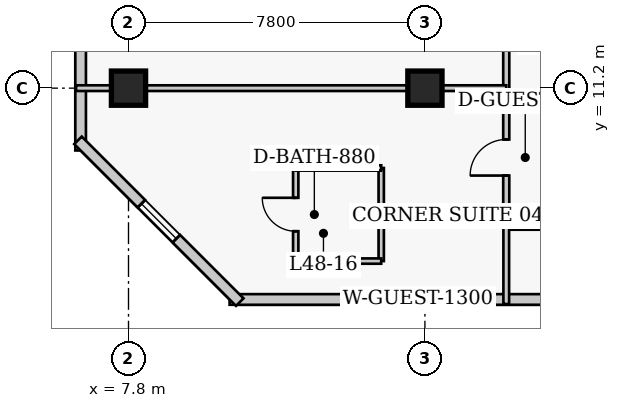
"""IFC4 building model, lengths in metres.
Left out: names, types, materials, properties, quantities, classifications, styles, units other than length and angle.
Written with IfcOpenShell. Run it as: python <this file> out.ifc"""

import sys

from ifc_helpers import new_model, si_unit, direction, frame, frame_2d, origin, origin_2d, place, context, subcontext, project, spatial, rectangle, extrude, element, fill, save


model = new_model("IFC4")
c1 = context("Model", 3, precision=1e-05, world=origin(), true_north=direction((0.0, 1.0)))
c2 = subcontext(c1, "Body", "Model", "MODEL_VIEW")
j1 = project(units=[si_unit("LENGTHUNIT", "METRE"), si_unit("PLANEANGLEUNIT", "RADIAN")], contexts=[c1])
p1 = place(None, origin())
s1 = spatial("IfcSite", under=j1, at=p1, CompositionType="ELEMENT")
p2 = place(p1, origin())
s2 = spatial("IfcBuilding", under=s1, at=p2, CompositionType="ELEMENT")
p3 = place(p2, frame((0.0, 0.0, 192.9)))
s3 = spatial("IfcBuildingStorey", under=s2, at=p3, CompositionType="ELEMENT", Elevation=192.9)
for number, where, z_axis, x_axis in (
    (1, (7.8, 11.2, 0.0), (0.0, 0.0, 1.0), (1.0, 0.0, 0.0)),
    (2, (15.6, 11.2, 0.0), (0.0, 0.0, 1.0), (1.0, 0.0, 0.0)),
):
    element("IfcColumn", number, at=place(p3, frame(where, z_axis=z_axis, x_axis=x_axis)), inside=s3, PredefinedType="COLUMN", context=c2, shape_type="SweptSolid", body=[
        extrude(rectangle(XDim=0.9, YDim=0.9, at=origin_2d()), origin(), (0.0, 0.0, 1.0), 3.9),
    ])
p4 = place(p3, frame((10.46, 5.64, 0.0), z_axis=(0.0, 0.0, 1.0), x_axis=(1.0, 0.0, 0.0)))
e3 = element("IfcWall", 3, at=p4, inside=s3, PredefinedType="SOLIDWALL", context=c2, shape_type="SweptSolid", body=[
    extrude(rectangle(XDim=25.83, YDim=0.28, at=frame_2d((12.915, 0.0))), origin(), (0.0, 0.0, 1.0), 3.65),
])
p5 = place(p4, frame((4.305, 0.0, 0.85)))
e4 = element("IfcOpeningElement", 4, at=p5, cuts=e3, PredefinedType="OPENING", context=c2, shape_type="SweptSolid", body=[
    extrude(rectangle(XDim=1.3, YDim=1.7, at=frame_2d((0.65, 0.85))), frame((0.0, 0.15, 0.0), z_axis=(0.0, -1.0, 0.0), x_axis=(1.0, 0.0, 0.0)), (0.0, 0.0, 1.0), 0.3),
])
p6 = place(p4, frame((11.615, 0.0, 0.85)))
e5 = element("IfcOpeningElement", 5, at=p6, cuts=e3, PredefinedType="OPENING", context=c2, shape_type="SweptSolid", body=[
    extrude(rectangle(XDim=1.3, YDim=1.7, at=frame_2d((0.65, 0.85))), frame((0.0, 0.15, 0.0), z_axis=(0.0, -1.0, 0.0), x_axis=(1.0, 0.0, 0.0)), (0.0, 0.0, 1.0), 0.3),
])
p7 = place(p4, frame((20.875, 0.0, 0.85)))
e6 = element("IfcOpeningElement", 6, at=p7, cuts=e3, PredefinedType="OPENING", context=c2, shape_type="SweptSolid", body=[
    extrude(rectangle(XDim=1.3, YDim=1.7, at=frame_2d((0.65, 0.85))), frame((0.0, 0.15, 0.0), z_axis=(0.0, -1.0, 0.0), x_axis=(1.0, 0.0, 0.0)), (0.0, 0.0, 1.0), 0.3),
])
p8 = place(p3, frame((6.54, 39.44, 0.0), z_axis=(0.0, 0.0, 1.0), x_axis=(0.0, -1.0, 0.0)))
e7 = element("IfcWall", 7, at=p8, inside=s3, PredefinedType="SOLIDWALL", context=c2, shape_type="SweptSolid", body=[
    extrude(rectangle(XDim=29.88, YDim=0.28, at=frame_2d((14.94, 0.0))), origin(), (0.0, 0.0, 1.0), 3.65),
])
p9 = place(p8, frame((2.435, 0.0, 0.85)))
e8 = element("IfcOpeningElement", 8, at=p9, cuts=e7, PredefinedType="OPENING", context=c2, shape_type="SweptSolid", body=[
    extrude(rectangle(XDim=1.3, YDim=1.7, at=frame_2d((0.65, 0.85))), frame((0.0, 0.15, 0.0), z_axis=(0.0, -1.0, 0.0), x_axis=(1.0, 0.0, 0.0)), (0.0, 0.0, 1.0), 0.3),
])
p10 = place(p8, frame((11.205, 0.0, 0.85)))
e9 = element("IfcOpeningElement", 9, at=p10, cuts=e7, PredefinedType="OPENING", context=c2, shape_type="SweptSolid", body=[
    extrude(rectangle(XDim=1.3, YDim=1.7, at=frame_2d((0.65, 0.85))), frame((0.0, 0.15, 0.0), z_axis=(0.0, -1.0, 0.0), x_axis=(1.0, 0.0, 0.0)), (0.0, 0.0, 1.0), 0.3),
])
p11 = place(p8, frame((17.375, 0.0, 0.85)))
e10 = element("IfcOpeningElement", 10, at=p11, cuts=e7, PredefinedType="OPENING", context=c2, shape_type="SweptSolid", body=[
    extrude(rectangle(XDim=1.3, YDim=1.7, at=frame_2d((0.65, 0.85))), frame((0.0, 0.15, 0.0), z_axis=(0.0, -1.0, 0.0), x_axis=(1.0, 0.0, 0.0)), (0.0, 0.0, 1.0), 0.3),
])
p12 = place(p8, frame((25.495, 0.0, 0.85)))
e11 = element("IfcOpeningElement", 11, at=p12, cuts=e7, PredefinedType="OPENING", context=c2, shape_type="SweptSolid", body=[
    extrude(rectangle(XDim=1.3, YDim=1.7, at=frame_2d((0.65, 0.85))), frame((0.0, 0.15, 0.0), z_axis=(0.0, -1.0, 0.0), x_axis=(1.0, 0.0, 0.0)), (0.0, 0.0, 1.0), 0.3),
])
p13 = place(p8, frame((6.68, 0.0, 0.85)))
e12 = element("IfcOpeningElement", 12, at=p13, cuts=e7, PredefinedType="OPENING", context=c2, shape_type="SweptSolid", body=[
    extrude(rectangle(XDim=1.3, YDim=1.7, at=frame_2d((0.65, 0.85))), frame((0.0, 0.15, 0.0), z_axis=(0.0, -1.0, 0.0), x_axis=(1.0, 0.0, 0.0)), (0.0, 0.0, 1.0), 0.3),
])
p14 = place(p3, frame((6.471, 9.827, 0.0), z_axis=(0.0, 0.0, 1.0), x_axis=(0.707106781187, -0.707106781187, 0.0)))
e13 = element("IfcWall", 13, at=p14, inside=s3, PredefinedType="SOLIDWALL", context=c2, shape_type="SweptSolid", body=[
    extrude(rectangle(XDim=6.02, YDim=0.28, at=frame_2d((3.01, 0.0))), origin(), (0.0, 0.0, 1.0), 3.65),
])
p15 = place(p14, frame((2.36, 0.0, 0.85)))
e14 = element("IfcOpeningElement", 14, at=p15, cuts=e13, PredefinedType="OPENING", context=c2, shape_type="SweptSolid", body=[
    extrude(rectangle(XDim=1.3, YDim=1.7, at=frame_2d((0.65, 0.85))), frame((0.0, 0.15, 0.0), z_axis=(0.0, -1.0, 0.0), x_axis=(1.0, 0.0, 0.0)), (0.0, 0.0, 1.0), 0.3),
])
p16 = place(p3, frame((17.74, 7.55, 0.0), z_axis=(0.0, 0.0, 1.0), x_axis=(0.0, 1.0, 0.0)))
e15 = element("IfcWall", 15, at=p16, inside=s3, PredefinedType="PARTITIONING", context=c2, shape_type="SweptSolid", body=[
    extrude(rectangle(XDim=33.1, YDim=0.16, at=frame_2d((16.55, 0.0))), origin(), (0.0, 0.0, 1.0), 3.65),
])
p17 = place(p16, frame((1.35, 0.0, 0.0)))
e16 = element("IfcOpeningElement", 16, at=p17, cuts=e15, PredefinedType="OPENING", context=c2, shape_type="SweptSolid", body=[
    extrude(rectangle(XDim=0.95, YDim=2.1, at=frame_2d((0.475, 1.05))), frame((0.0, 0.09, 0.0), z_axis=(0.0, -1.0, 0.0), x_axis=(1.0, 0.0, 0.0)), (0.0, 0.0, 1.0), 0.18),
])
p18 = place(p16, frame((7.575, 0.0, 0.0)))
e17 = element("IfcOpeningElement", 17, at=p18, cuts=e15, PredefinedType="OPENING", context=c2, shape_type="SweptSolid", body=[
    extrude(rectangle(XDim=0.95, YDim=2.1, at=frame_2d((0.475, 1.05))), frame((0.0, 0.09, 0.0), z_axis=(0.0, -1.0, 0.0), x_axis=(1.0, 0.0, 0.0)), (0.0, 0.0, 1.0), 0.18),
])
p19 = place(p16, frame((16.375, 0.0, 0.0)))
e18 = element("IfcOpeningElement", 18, at=p19, cuts=e15, PredefinedType="OPENING", context=c2, shape_type="SweptSolid", body=[
    extrude(rectangle(XDim=0.95, YDim=2.1, at=frame_2d((0.475, 1.05))), frame((0.0, 0.09, 0.0), z_axis=(0.0, -1.0, 0.0), x_axis=(1.0, 0.0, 0.0)), (0.0, 0.0, 1.0), 0.18),
])
p20 = place(p16, frame((24.075, 0.0, 0.0)))
e19 = element("IfcOpeningElement", 19, at=p20, cuts=e15, PredefinedType="OPENING", context=c2, shape_type="SweptSolid", body=[
    extrude(rectangle(XDim=0.95, YDim=2.1, at=frame_2d((0.475, 1.05))), frame((0.0, 0.09, 0.0), z_axis=(0.0, -1.0, 0.0), x_axis=(1.0, 0.0, 0.0)), (0.0, 0.0, 1.0), 0.18),
])
p21 = place(p16, frame((28.4, 0.0, 0.0)))
e20 = element("IfcOpeningElement", 20, at=p21, cuts=e15, PredefinedType="OPENING", context=c2, shape_type="SweptSolid", body=[
    extrude(rectangle(XDim=1.0, YDim=2.15, at=frame_2d((0.5, 1.075))), frame((0.0, 0.09, 0.0), z_axis=(0.0, -1.0, 0.0), x_axis=(1.0, 0.0, 0.0)), (0.0, 0.0, 1.0), 0.18),
])
p22 = place(p3, frame((17.74, 7.55, 0.0), z_axis=(0.0, 0.0, 1.0), x_axis=(1.0, 0.0, 0.0)))
e21 = element("IfcWall", 21, at=p22, inside=s3, PredefinedType="PARTITIONING", context=c2, shape_type="SweptSolid", body=[
    extrude(rectangle(XDim=2.22, YDim=0.15, at=frame_2d((1.11, 0.0))), origin(), (0.0, 0.0, 1.0), 3.65),
])
p23 = place(p3, frame((17.74, 5.52, 0.0), z_axis=(0.0, 0.0, 1.0), x_axis=(0.0, 1.0, 0.0)))
e22 = element("IfcWall", 22, at=p23, inside=s3, PredefinedType="PARTITIONING", context=c2, shape_type="SweptSolid", body=[
    extrude(rectangle(XDim=2.03, YDim=0.15, at=frame_2d((1.015, 0.0))), origin(), (0.0, 0.0, 1.0), 3.65),
])
p24 = place(p3, frame((12.2, 6.65, 0.0), z_axis=(0.0, 0.0, 1.0), x_axis=(0.0, 1.0, 0.0)))
e23 = element("IfcWall", 23, at=p24, inside=s3, PredefinedType="PLUMBINGWALL", context=c2, shape_type="SweptSolid", body=[
    extrude(rectangle(XDim=2.45, YDim=0.14, at=frame_2d((1.225, 0.0))), origin(), (0.0, 0.0, 1.0), 3.65),
])
p25 = place(p24, frame((0.785, 0.0, 0.0)))
e24 = element("IfcOpeningElement", 24, at=p25, cuts=e23, PredefinedType="OPENING", context=c2, shape_type="SweptSolid", body=[
    extrude(rectangle(XDim=0.88, YDim=2.05, at=frame_2d((0.44, 1.025))), frame((0.0, 0.08, 0.0), z_axis=(0.0, -1.0, 0.0), x_axis=(1.0, 0.0, 0.0)), (0.0, 0.0, 1.0), 0.16),
])
p26 = place(p3, frame((14.45, 6.65, 0.0), z_axis=(0.0, 0.0, 1.0), x_axis=(0.0, 1.0, 0.0)))
e25 = element("IfcWall", 25, at=p26, inside=s3, PredefinedType="PLUMBINGWALL", context=c2, shape_type="SweptSolid", body=[
    extrude(rectangle(XDim=2.45, YDim=0.14, at=frame_2d((1.225, 0.0))), origin(), (0.0, 0.0, 1.0), 3.65),
])
for number, where, z_axis, x_axis in (
    (26, (12.2, 6.65, 0.0), (0.0, 0.0, 1.0), (1.0, 0.0, 0.0)),
    (27, (12.2, 9.1, 0.0), (0.0, 0.0, 1.0), (1.0, 0.0, 0.0)),
):
    element("IfcWall", number, at=place(p3, frame(where, z_axis=z_axis, x_axis=x_axis)), inside=s3, PredefinedType="PLUMBINGWALL", context=c2, shape_type="SweptSolid", body=[
        extrude(rectangle(XDim=2.25, YDim=0.14, at=frame_2d((1.125, 0.0))), origin(), (0.0, 0.0, 1.0), 3.65),
    ])
p27 = place(p3, frame((6.42, 11.2, 0.0), z_axis=(0.0, 0.0, 1.0), x_axis=(1.0, 0.0, 0.0)))
e28 = element("IfcWall", 28, at=p27, inside=s3, PredefinedType="PARTITIONING", context=c2, shape_type="SweptSolid", body=[
    extrude(rectangle(XDim=11.32, YDim=0.15, at=frame_2d((5.66, 0.0))), origin(), (0.0, 0.0, 1.0), 2.878),
])
p28 = place(p5, origin())
e29 = element("IfcWindow", 29, at=p28, inside=s3, PartitioningType="SINGLE_PANEL", PredefinedType="WINDOW", context=c2, shape_type="SweptSolid", body=[
    extrude(rectangle(XDim=1.3, YDim=1.7, at=frame_2d((0.65, 0.85))), frame((0.0, 0.03, 0.0), z_axis=(0.0, -1.0, 0.0), x_axis=(1.0, 0.0, 0.0)), (0.0, 0.0, 1.0), 0.06),
])
fill(e4, e29)
p29 = place(p15, origin())
e30 = element("IfcWindow", 30, at=p29, inside=s3, PartitioningType="SINGLE_PANEL", PredefinedType="WINDOW", context=c2, shape_type="SweptSolid", body=[
    extrude(rectangle(XDim=1.3, YDim=1.7, at=frame_2d((0.65, 0.85))), frame((0.0, 0.03, 0.0), z_axis=(0.0, -1.0, 0.0), x_axis=(1.0, 0.0, 0.0)), (0.0, 0.0, 1.0), 0.06),
])
fill(e14, e30)
p30 = place(p25, origin())
e31 = element("IfcDoor", 31, at=p30, inside=s3, OperationType="SINGLE_SWING_RIGHT", PredefinedType="DOOR", context=c2, shape_type="SweptSolid", body=[
    extrude(rectangle(XDim=0.88, YDim=2.05, at=frame_2d((0.44, 1.025))), frame((0.0, 0.025, 0.0), z_axis=(0.0, -1.0, 0.0), x_axis=(1.0, 0.0, 0.0)), (0.0, 0.0, 1.0), 0.05),
])
fill(e24, e31)
p31 = place(p17, origin())
e32 = element("IfcDoor", 32, at=p31, inside=s3, OperationType="SINGLE_SWING_LEFT", PredefinedType="DOOR", context=c2, shape_type="SweptSolid", body=[
    extrude(rectangle(XDim=0.95, YDim=2.1, at=frame_2d((0.475, 1.05))), frame((0.0, 0.025, 0.0), z_axis=(0.0, -1.0, 0.0), x_axis=(1.0, 0.0, 0.0)), (0.0, 0.0, 1.0), 0.05),
])
fill(e16, e32)
save(model, sys.argv[1])
